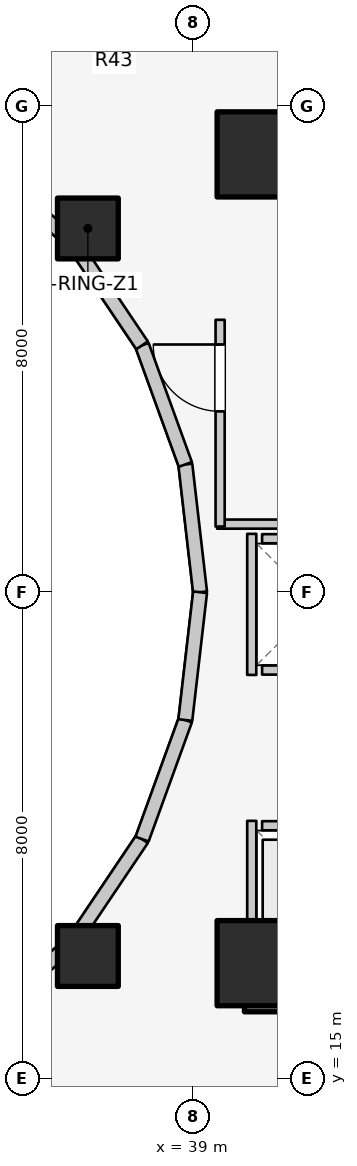
"""IFC4 building model, lengths in metres.
Left out: names, types, materials, properties, quantities, classifications, styles, units other than length and angle.
Written with IfcOpenShell. Run it as: python <this file> out.ifc"""

import sys

from ifc_helpers import new_model, si_unit, direction, frame, frame_2d, origin, origin_2d, place, context, subcontext, project, spatial, rectangle, extrude, element, fill, save


model = new_model("IFC4")
c1 = context("Model", 3, precision=1e-05, world=origin(), true_north=direction((0.0, 1.0)))
c2 = subcontext(c1, "Body", "Model", "MODEL_VIEW")
j1 = project(units=[si_unit("LENGTHUNIT", "METRE"), si_unit("PLANEANGLEUNIT", "RADIAN")], contexts=[c1])
p1 = place(None, origin())
s1 = spatial("IfcSite", under=j1, at=p1, CompositionType="ELEMENT")
p2 = place(p1, origin())
s2 = spatial("IfcBuilding", under=s1, at=p2, CompositionType="ELEMENT")
p3 = place(p2, frame((0.0, 0.0, 52.4)))
s3 = spatial("IfcBuildingStorey", under=s2, at=p3, CompositionType="ELEMENT", Elevation=52.4)
for number, where, z_axis, x_axis in (
    (1, (39.85, 16.55, 0.0), (0.0, 0.0, 1.0), (1.0, 0.0, 0.0)),
    (2, (39.85, 30.35, 0.0), (0.0, 0.0, 1.0), (1.0, 0.0, 0.0)),
):
    element("IfcWall", number, at=place(p3, frame(where, z_axis=z_axis, x_axis=x_axis)), inside=s3, PredefinedType="SHEAR", context=c2, shape_type="SweptSolid", body=[
        extrude(rectangle(XDim=4.5, YDim=0.9, at=frame_2d((2.25, 0.0))), origin(), (0.0, 0.0, 1.0), 3.1),
    ])
for number, where, z_axis, x_axis in (
    (3, (40.1, 16.9, 0.0), (0.0, 0.0, 1.0), (1.0, 0.0, 0.0)),
    (4, (40.1, 30.2, 0.0), (0.0, 0.0, 1.0), (1.0, 0.0, 0.0)),
):
    element("IfcColumn", number, at=place(p3, frame(where, z_axis=z_axis, x_axis=x_axis)), inside=s3, PredefinedType="COLUMN", context=c2, shape_type="SweptSolid", body=[
        extrude(rectangle(XDim=1.4, YDim=1.4, at=origin_2d()), origin(), (0.0, 0.0, 1.0), 3.1),
    ])
for number, where, z_axis, x_axis in (
    (5, (37.275, 28.982, 0.0), (0.0, 0.0, 1.0), (1.0, 0.0, 0.0)),
    (6, (37.275, 17.018, 0.0), (0.0, 0.0, 1.0), (1.0, 0.0, 0.0)),
):
    element("IfcColumn", number, at=place(p3, frame(where, z_axis=z_axis, x_axis=x_axis)), inside=s3, PredefinedType="COLUMN", context=c2, shape_type="SweptSolid", body=[
        extrude(rectangle(XDim=1.0, YDim=1.0, at=origin_2d()), origin(), (0.0, 0.0, 1.0), 3.1),
    ])
p4 = place(p3, frame((39.12, 23.0, 0.0), z_axis=(0.0, 0.0, 1.0), x_axis=(-0.114711713601, 0.993398823617, 0.0)))
e7 = element("IfcWall", 7, at=p4, inside=s3, PredefinedType="STANDARD", context=c2, shape_type="SweptSolid", body=[
    extrude(rectangle(XDim=2.115, YDim=0.23, at=frame_2d((1.058, 0.0))), origin(), (0.0, 0.0, 1.0), 2.56),
])
p5 = place(p3, frame((38.877, 25.102, 0.0), z_axis=(0.0, 0.0, 1.0), x_axis=(-0.341423187295, 0.93990968033, 0.0)))
e8 = element("IfcWall", 8, at=p5, inside=s3, PredefinedType="STANDARD", context=c2, shape_type="SweptSolid", body=[
    extrude(rectangle(XDim=2.084, YDim=0.23, at=frame_2d((1.042, 0.0))), origin(), (0.0, 0.0, 1.0), 2.56),
])
p6 = place(p3, frame((38.166, 27.06, 0.0), z_axis=(0.0, 0.0, 1.0), x_axis=(-0.558197800898, 0.829707909492, 0.0)))
e9 = element("IfcWall", 9, at=p6, inside=s3, PredefinedType="STANDARD", context=c2, shape_type="SweptSolid", body=[
    extrude(rectangle(XDim=2.027, YDim=0.23, at=frame_2d((1.013, 0.0))), origin(), (0.0, 0.0, 1.0), 1.22),
])
for number, where, z_axis, x_axis in (
    (10, (37.035, 28.742, 0.0), (0.0, 0.0, 1.0), (-0.753, 0.659, 0.0)),
    (11, (35.56, 15.968, 0.0), (0.0, 0.0, 1.0), (0.753, 0.659, 0.0)),
):
    element("IfcWall", number, at=place(p3, frame(where, z_axis=z_axis, x_axis=x_axis)), inside=s3, PredefinedType="STANDARD", context=c2, shape_type="SweptSolid", body=[
        extrude(rectangle(XDim=1.959, YDim=0.23, at=frame_2d((0.98, 0.0))), origin(), (0.0, 0.0, 1.0), 1.22),
    ])
p7 = place(p3, frame((37.035, 17.258, 0.0), z_axis=(0.0, 0.0, 1.0), x_axis=(0.558197800898, 0.829707909492, 0.0)))
e12 = element("IfcWall", 12, at=p7, inside=s3, PredefinedType="STANDARD", context=c2, shape_type="SweptSolid", body=[
    extrude(rectangle(XDim=2.027, YDim=0.23, at=frame_2d((1.013, 0.0))), origin(), (0.0, 0.0, 1.0), 1.22),
])
p8 = place(p3, frame((38.166, 18.94, 0.0), z_axis=(0.0, 0.0, 1.0), x_axis=(0.341423187295, 0.93990968033, 0.0)))
e13 = element("IfcWall", 13, at=p8, inside=s3, PredefinedType="STANDARD", context=c2, shape_type="SweptSolid", body=[
    extrude(rectangle(XDim=2.084, YDim=0.23, at=frame_2d((1.042, 0.0))), origin(), (0.0, 0.0, 1.0), 2.56),
])
p9 = place(p3, frame((38.877, 20.898, 0.0), z_axis=(0.0, 0.0, 1.0), x_axis=(0.114711713601, 0.993398823617, 0.0)))
e14 = element("IfcWall", 14, at=p9, inside=s3, PredefinedType="STANDARD", context=c2, shape_type="SweptSolid", body=[
    extrude(rectangle(XDim=2.115, YDim=0.23, at=frame_2d((1.058, 0.0))), origin(), (0.0, 0.0, 1.0), 2.56),
])
p10 = place(p3, frame((40.14, 19.16, 0.0), z_axis=(0.0, 0.0, 1.0), x_axis=(1.0, 0.0, 0.0)))
e15 = element("IfcWall", 15, at=p10, inside=s3, PredefinedType="SOLIDWALL", context=c2, shape_type="SweptSolid", body=[
    extrude(rectangle(XDim=1.82, YDim=0.15, at=frame_2d((0.91, 0.0))), origin(), (0.0, 0.0, 1.0), 2.12),
])
p11 = place(p10, frame((0.36, 0.0, 0.0)))
e16 = element("IfcOpeningElement", 16, at=p11, cuts=e15, PredefinedType="OPENING", context=c2, shape_type="SweptSolid", body=[
    extrude(rectangle(XDim=1.1, YDim=2.1, at=frame_2d((0.55, 1.05))), frame((0.0, 0.085, 0.0), z_axis=(0.0, -1.0, 0.0), x_axis=(1.0, 0.0, 0.0)), (0.0, 0.0, 1.0), 0.17),
])
p12 = place(p3, frame((40.14, 17.1, 0.0), z_axis=(0.0, 0.0, 1.0), x_axis=(1.0, 0.0, 0.0)))
e17 = element("IfcWall", 17, at=p12, inside=s3, PredefinedType="SOLIDWALL", context=c2, shape_type="SweptSolid", body=[
    extrude(rectangle(XDim=1.82, YDim=0.15, at=frame_2d((0.91, 0.0))), origin(), (0.0, 0.0, 1.0), 2.12),
])
p13 = place(p3, frame((39.97, 17.02, 0.0), z_axis=(0.0, 0.0, 1.0), x_axis=(0.0, 1.0, 0.0)))
e18 = element("IfcWall", 18, at=p13, inside=s3, PredefinedType="SOLIDWALL", context=c2, shape_type="SweptSolid", body=[
    extrude(rectangle(XDim=2.22, YDim=0.15, at=frame_2d((1.11, 0.0))), origin(), (0.0, 0.0, 1.0), 1.873),
])
for number, where, z_axis, x_axis in (
    (19, (40.14, 21.72, 0.0), (0.0, 0.0, 1.0), (1.0, 0.0, 0.0)),
    (20, (40.14, 23.88, 0.0), (0.0, 0.0, 1.0), (1.0, 0.0, 0.0)),
):
    element("IfcWall", number, at=place(p3, frame(where, z_axis=z_axis, x_axis=x_axis)), inside=s3, PredefinedType="SOLIDWALL", context=c2, shape_type="SweptSolid", body=[
        extrude(rectangle(XDim=1.82, YDim=0.15, at=frame_2d((0.91, 0.0))), origin(), (0.0, 0.0, 1.0), 2.12),
    ])
p14 = place(p3, frame((39.97, 21.64, 0.0), z_axis=(0.0, 0.0, 1.0), x_axis=(0.0, 1.0, 0.0)))
e21 = element("IfcWall", 21, at=p14, inside=s3, PredefinedType="SOLIDWALL", context=c2, shape_type="SweptSolid", body=[
    extrude(rectangle(XDim=2.32, YDim=0.15, at=frame_2d((1.16, 0.0))), origin(), (0.0, 0.0, 1.0), 2.12),
])
p15 = place(p3, frame((39.4, 24.12, 0.0), z_axis=(0.0, 0.0, 1.0), x_axis=(1.0, 0.0, 0.0)))
e22 = element("IfcWall", 22, at=p15, inside=s3, PredefinedType="PARTITIONING", context=c2, shape_type="SweptSolid", body=[
    extrude(rectangle(XDim=5.08, YDim=0.15, at=frame_2d((2.54, 0.0))), origin(), (0.0, 0.0, 1.0), 2.12),
])
p16 = place(p3, frame((39.45, 24.08, 0.0), z_axis=(0.0, 0.0, 1.0), x_axis=(0.0, 1.0, 0.0)))
e23 = element("IfcWall", 23, at=p16, inside=s3, PredefinedType="PARTITIONING", context=c2, shape_type="SweptSolid", body=[
    extrude(rectangle(XDim=3.4, YDim=0.15, at=frame_2d((1.7, 0.0))), origin(), (0.0, 0.0, 1.0), 2.575),
])
p17 = place(p16, frame((1.894, 0.0, 0.0)))
e24 = element("IfcOpeningElement", 24, at=p17, cuts=e23, PredefinedType="OPENING", context=c2, shape_type="SweptSolid", body=[
    extrude(rectangle(XDim=1.1, YDim=2.1, at=frame_2d((0.55, 1.05))), frame((0.0, 0.085, 0.0), z_axis=(0.0, -1.0, 0.0), x_axis=(1.0, 0.0, 0.0)), (0.0, 0.0, 1.0), 0.17),
])
p18 = place(p17, origin())
e25 = element("IfcDoor", 25, at=p18, inside=s3, OperationType="SINGLE_SWING_RIGHT", PredefinedType="DOOR", context=c2, shape_type="SweptSolid", body=[
    extrude(rectangle(XDim=1.1, YDim=2.1, at=frame_2d((0.55, 1.05))), frame((0.0, 0.025, 0.0), z_axis=(0.0, -1.0, 0.0), x_axis=(1.0, 0.0, 0.0)), (0.0, 0.0, 1.0), 0.05),
])
fill(e24, e25)
save(model, sys.argv[1])
